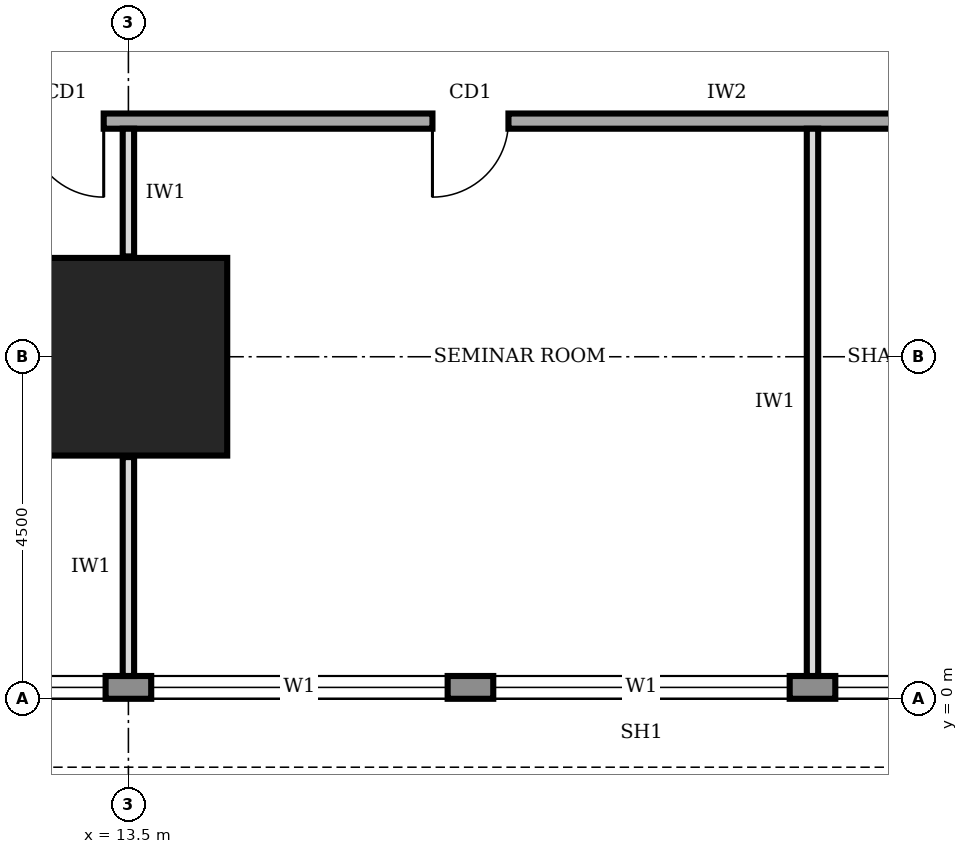
"""IFC4 building model, lengths in metres.
Left out: names, types, materials, properties, quantities, classifications, styles, units other than length and angle.
Written with IfcOpenShell. Run it as: python <this file> out.ifc"""

import sys

from ifc_helpers import new_model, si_unit, direction, frame, frame_2d, origin, origin_2d, place, context, subcontext, project, spatial, rectangle, extrude, element, fill, save


model = new_model("IFC4")
c1 = context("Model", 3, precision=1e-05, world=origin(), true_north=direction((0.0, 1.0)))
c2 = subcontext(c1, "Body", "Model", "MODEL_VIEW")
j1 = project(units=[si_unit("LENGTHUNIT", "METRE"), si_unit("PLANEANGLEUNIT", "RADIAN")], contexts=[c1])
p1 = place(None, origin())
s1 = spatial("IfcSite", under=j1, at=p1, CompositionType="ELEMENT")
p2 = place(p1, origin())
s2 = spatial("IfcBuilding", under=s1, at=p2, CompositionType="ELEMENT")
p3 = place(p2, frame((0.0, 0.0, 33.0)))
s3 = spatial("IfcBuildingStorey", under=s2, at=p3, CompositionType="ELEMENT", Elevation=33.0)
p4 = place(p3, frame((13.5, 4.5, 0.0), z_axis=(0.0, 0.0, 1.0), x_axis=(1.0, 0.0, 0.0)))
e1 = element("IfcColumn", 1, at=p4, inside=s3, PredefinedType="COLUMN", context=c2, shape_type="SweptSolid", body=[
    extrude(rectangle(XDim=2.6, YDim=2.6, at=origin_2d()), origin(), (0.0, 0.0, 1.0), 4.0),
])
p5 = place(p3, frame((4.52, 0.15, 0.0), z_axis=(0.0, 0.0, 1.0), x_axis=(1.0, 0.0, 0.0)))
e2 = element("IfcWall", 2, at=p5, inside=s3, PredefinedType="STANDARD", context=c2, shape_type="SweptSolid", body=[
    extrude(rectangle(XDim=31.46, YDim=0.3, at=frame_2d((15.73, 0.0))), origin(), (0.0, 0.0, 1.0), 3.75),
])
p6 = place(p5, frame((4.78, 0.0, 0.9)))
e3 = element("IfcOpeningElement", 3, at=p6, cuts=e2, PredefinedType="OPENING", context=c2, shape_type="SweptSolid", body=[
    extrude(rectangle(XDim=3.9, YDim=2.2, at=frame_2d((1.95, 1.1))), frame((0.0, 0.16, 0.0), z_axis=(0.0, -1.0, 0.0), x_axis=(1.0, 0.0, 0.0)), (0.0, 0.0, 1.0), 0.32),
])
p7 = place(p5, frame((9.28, 0.0, 0.9)))
e4 = element("IfcOpeningElement", 4, at=p7, cuts=e2, PredefinedType="OPENING", context=c2, shape_type="SweptSolid", body=[
    extrude(rectangle(XDim=3.9, YDim=2.2, at=frame_2d((1.95, 1.1))), frame((0.0, 0.16, 0.0), z_axis=(0.0, -1.0, 0.0), x_axis=(1.0, 0.0, 0.0)), (0.0, 0.0, 1.0), 0.32),
])
p8 = place(p5, frame((13.78, 0.0, 0.9)))
e5 = element("IfcOpeningElement", 5, at=p8, cuts=e2, PredefinedType="OPENING", context=c2, shape_type="SweptSolid", body=[
    extrude(rectangle(XDim=3.9, YDim=2.2, at=frame_2d((1.95, 1.1))), frame((0.0, 0.16, 0.0), z_axis=(0.0, -1.0, 0.0), x_axis=(1.0, 0.0, 0.0)), (0.0, 0.0, 1.0), 0.32),
])
p9 = place(p5, frame((18.28, 0.0, 0.9)))
e6 = element("IfcOpeningElement", 6, at=p9, cuts=e2, PredefinedType="OPENING", context=c2, shape_type="SweptSolid", body=[
    extrude(rectangle(XDim=3.9, YDim=2.2, at=frame_2d((1.95, 1.1))), frame((0.0, 0.16, 0.0), z_axis=(0.0, -1.0, 0.0), x_axis=(1.0, 0.0, 0.0)), (0.0, 0.0, 1.0), 0.32),
])
p10 = place(p5, frame((22.78, 0.0, 0.9)))
e7 = element("IfcOpeningElement", 7, at=p10, cuts=e2, PredefinedType="OPENING", context=c2, shape_type="SweptSolid", body=[
    extrude(rectangle(XDim=3.9, YDim=2.2, at=frame_2d((1.95, 1.1))), frame((0.0, 0.16, 0.0), z_axis=(0.0, -1.0, 0.0), x_axis=(1.0, 0.0, 0.0)), (0.0, 0.0, 1.0), 0.32),
])
p11 = place(p5, frame((27.28, 0.0, 0.9)))
e8 = element("IfcOpeningElement", 8, at=p11, cuts=e2, PredefinedType="OPENING", context=c2, shape_type="SweptSolid", body=[
    extrude(rectangle(XDim=3.9, YDim=2.2, at=frame_2d((1.95, 1.1))), frame((0.0, 0.16, 0.0), z_axis=(0.0, -1.0, 0.0), x_axis=(1.0, 0.0, 0.0)), (0.0, 0.0, 1.0), 0.32),
])
p12 = place(p3, frame((11.9, 7.6, 0.0), z_axis=(0.0, 0.0, 1.0), x_axis=(1.0, 0.0, 0.0)))
e9 = element("IfcWall", 9, at=p12, inside=s3, PredefinedType="SOLIDWALL", context=c2, shape_type="SweptSolid", body=[
    extrude(rectangle(XDim=16.9, YDim=0.2, at=frame_2d((8.45, 0.0))), origin(), (0.0, 0.0, 1.0), 3.75),
])
p13 = place(p12, frame((0.275, 0.0, 0.0)))
e10 = element("IfcOpeningElement", 10, at=p13, cuts=e9, PredefinedType="OPENING", context=c2, shape_type="SweptSolid", body=[
    extrude(rectangle(XDim=1.0, YDim=2.1, at=frame_2d((0.5, 1.05))), frame((0.0, 0.11, 0.0), z_axis=(0.0, -1.0, 0.0), x_axis=(1.0, 0.0, 0.0)), (0.0, 0.0, 1.0), 0.22),
])
p14 = place(p12, frame((5.6, 0.0, 0.0)))
e11 = element("IfcOpeningElement", 11, at=p14, cuts=e9, PredefinedType="OPENING", context=c2, shape_type="SweptSolid", body=[
    extrude(rectangle(XDim=1.0, YDim=2.1, at=frame_2d((0.5, 1.05))), frame((0.0, 0.11, 0.0), z_axis=(0.0, -1.0, 0.0), x_axis=(1.0, 0.0, 0.0)), (0.0, 0.0, 1.0), 0.22),
])
p15 = place(p12, frame((12.35, 0.0, 0.0)))
e12 = element("IfcOpeningElement", 12, at=p15, cuts=e9, PredefinedType="OPENING", context=c2, shape_type="SweptSolid", body=[
    extrude(rectangle(XDim=1.0, YDim=2.1, at=frame_2d((0.5, 1.05))), frame((0.0, 0.11, 0.0), z_axis=(0.0, -1.0, 0.0), x_axis=(1.0, 0.0, 0.0)), (0.0, 0.0, 1.0), 0.22),
])
p16 = place(p12, frame((15.425, 0.0, 0.0)))
e13 = element("IfcOpeningElement", 13, at=p16, cuts=e9, PredefinedType="OPENING", context=c2, shape_type="SweptSolid", body=[
    extrude(rectangle(XDim=1.0, YDim=2.1, at=frame_2d((0.5, 1.05))), frame((0.0, 0.11, 0.0), z_axis=(0.0, -1.0, 0.0), x_axis=(1.0, 0.0, 0.0)), (0.0, 0.0, 1.0), 0.22),
])
p17 = place(p3, frame((13.5, 0.3, 0.0), z_axis=(0.0, 0.0, 1.0), x_axis=(0.0, 1.0, 0.0)))
e14 = element("IfcWall", 14, at=p17, inside=s3, PredefinedType="PARTITIONING", context=c2, shape_type="SweptSolid", body=[
    extrude(rectangle(XDim=2.88, YDim=0.15, at=frame_2d((1.44, 0.0))), origin(), (0.0, 0.0, 1.0), 2.85),
])
p18 = place(p3, frame((13.5, 5.82, 0.0), z_axis=(0.0, 0.0, 1.0), x_axis=(0.0, 1.0, 0.0)))
e15 = element("IfcWall", 15, at=p18, inside=s3, PredefinedType="PARTITIONING", context=c2, shape_type="SweptSolid", body=[
    extrude(rectangle(XDim=1.68, YDim=0.15, at=frame_2d((0.84, 0.0))), origin(), (0.0, 0.0, 1.0), 2.85),
])
p19 = place(p3, frame((22.5, 0.3, 0.0), z_axis=(0.0, 0.0, 1.0), x_axis=(0.0, 1.0, 0.0)))
e16 = element("IfcWall", 16, at=p19, inside=s3, PredefinedType="PARTITIONING", context=c2, shape_type="SweptSolid", body=[
    extrude(rectangle(XDim=7.2, YDim=0.15, at=frame_2d((3.6, 0.0))), origin(), (0.0, 0.0, 1.0), 3.75),
])
p20 = place(p6, origin())
e17 = element("IfcWindow", 17, at=p20, inside=s3, PartitioningType="SINGLE_PANEL", PredefinedType="WINDOW", context=c2, shape_type="SweptSolid", body=[
    extrude(rectangle(XDim=3.9, YDim=2.2, at=frame_2d((1.95, 1.1))), frame((0.0, 0.03, 0.0), z_axis=(0.0, -1.0, 0.0), x_axis=(1.0, 0.0, 0.0)), (0.0, 0.0, 1.0), 0.06),
])
fill(e3, e17)
p21 = place(p7, origin())
e18 = element("IfcWindow", 18, at=p21, inside=s3, PartitioningType="SINGLE_PANEL", PredefinedType="WINDOW", context=c2, shape_type="SweptSolid", body=[
    extrude(rectangle(XDim=3.9, YDim=2.2, at=frame_2d((1.95, 1.1))), frame((0.0, 0.03, 0.0), z_axis=(0.0, -1.0, 0.0), x_axis=(1.0, 0.0, 0.0)), (0.0, 0.0, 1.0), 0.06),
])
fill(e4, e18)
p22 = place(p8, origin())
e19 = element("IfcWindow", 19, at=p22, inside=s3, PartitioningType="SINGLE_PANEL", PredefinedType="WINDOW", context=c2, shape_type="SweptSolid", body=[
    extrude(rectangle(XDim=3.9, YDim=2.2, at=frame_2d((1.95, 1.1))), frame((0.0, 0.03, 0.0), z_axis=(0.0, -1.0, 0.0), x_axis=(1.0, 0.0, 0.0)), (0.0, 0.0, 1.0), 0.06),
])
fill(e5, e19)
p23 = place(p9, origin())
e20 = element("IfcWindow", 20, at=p23, inside=s3, PartitioningType="SINGLE_PANEL", PredefinedType="WINDOW", context=c2, shape_type="SweptSolid", body=[
    extrude(rectangle(XDim=3.9, YDim=2.2, at=frame_2d((1.95, 1.1))), frame((0.0, 0.03, 0.0), z_axis=(0.0, -1.0, 0.0), x_axis=(1.0, 0.0, 0.0)), (0.0, 0.0, 1.0), 0.06),
])
fill(e6, e20)
p24 = place(p13, frame((1.0, 0.0, 0.0), z_axis=(0.0, 0.0, 1.0), x_axis=(-1.0, 0.0, 0.0)))
e21 = element("IfcDoor", 21, at=p24, inside=s3, OperationType="SINGLE_SWING_LEFT", PredefinedType="DOOR", context=c2, shape_type="SweptSolid", body=[
    extrude(rectangle(XDim=1.0, YDim=2.1, at=frame_2d((0.5, 1.05))), frame((0.0, 0.025, 0.0), z_axis=(0.0, -1.0, 0.0), x_axis=(1.0, 0.0, 0.0)), (0.0, 0.0, 1.0), 0.05),
])
fill(e10, e21)
p25 = place(p14, frame((1.0, 0.0, 0.0), z_axis=(0.0, 0.0, 1.0), x_axis=(-1.0, 0.0, 0.0)))
e22 = element("IfcDoor", 22, at=p25, inside=s3, OperationType="SINGLE_SWING_RIGHT", PredefinedType="DOOR", context=c2, shape_type="SweptSolid", body=[
    extrude(rectangle(XDim=1.0, YDim=2.1, at=frame_2d((0.5, 1.05))), frame((0.0, 0.025, 0.0), z_axis=(0.0, -1.0, 0.0), x_axis=(1.0, 0.0, 0.0)), (0.0, 0.0, 1.0), 0.05),
])
fill(e11, e22)
save(model, sys.argv[1])
